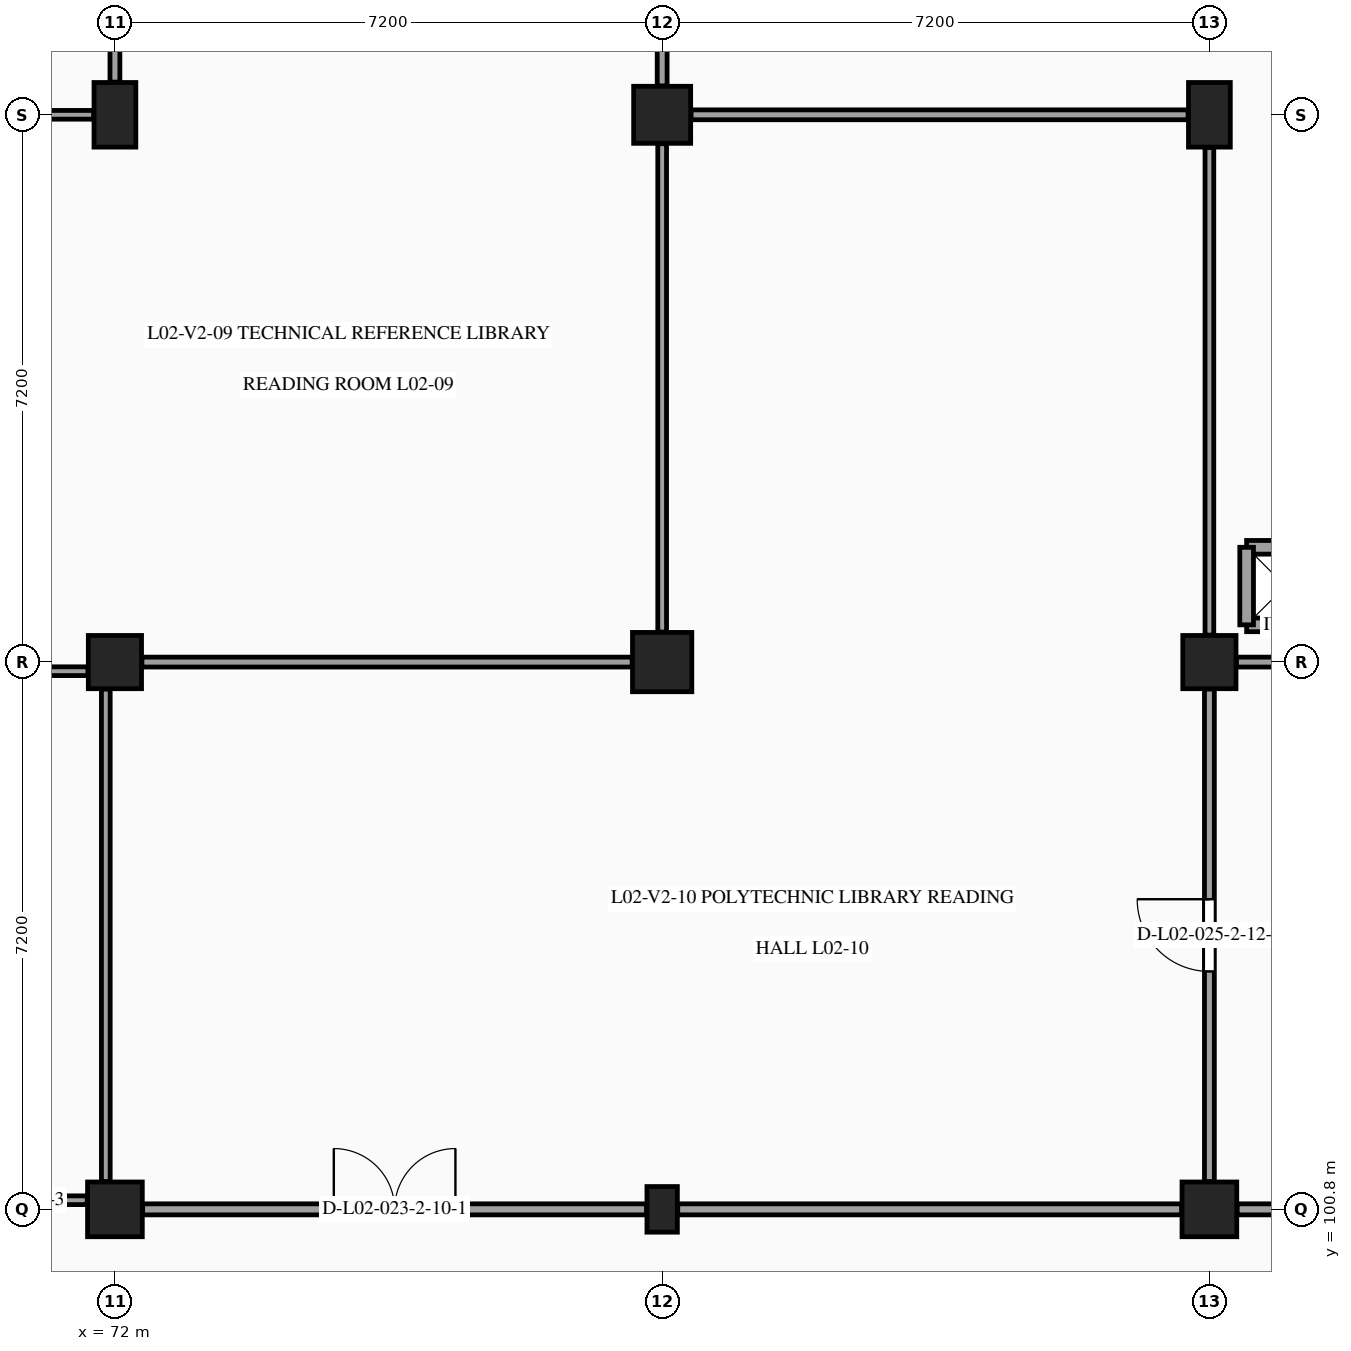
"""IFC4 building model, lengths in metres.
Left out: names, types, materials, properties, quantities, classifications, styles, units other than length and angle.
Written with IfcOpenShell. Run it as: python <this file> out.ifc"""

import sys

from ifc_helpers import new_model, si_unit, direction, frame, frame_2d, origin, origin_2d, place, context, subcontext, project, spatial, rectangle, extrude, element, fill, save


model = new_model("IFC4")
c1 = context("Model", 3, precision=1e-05, world=origin(), true_north=direction((0.0, 1.0)))
c2 = subcontext(c1, "Body", "Model", "MODEL_VIEW")
j1 = project(units=[si_unit("LENGTHUNIT", "METRE"), si_unit("PLANEANGLEUNIT", "RADIAN")], contexts=[c1])
p1 = place(None, origin())
s1 = spatial("IfcSite", under=j1, at=p1, CompositionType="ELEMENT")
p2 = place(p1, origin())
s2 = spatial("IfcBuilding", under=s1, at=p2, CompositionType="ELEMENT")
p3 = place(p2, frame((0.0, 0.0, 9.9)))
s3 = spatial("IfcBuildingStorey", under=s2, at=p3, CompositionType="ELEMENT", Elevation=9.9)
p4 = place(p3, frame((72.0, 100.8, 0.0), z_axis=(0.0, 0.0, 1.0), x_axis=(1.0, 0.0, 0.0)))
e1 = element("IfcColumn", 1, at=p4, inside=s3, PredefinedType="COLUMN", context=c2, shape_type="SweptSolid", body=[
    extrude(rectangle(XDim=0.72, YDim=0.72, at=origin_2d()), origin(), (0.0, 0.0, 1.0), 4.5),
])
p5 = place(p3, frame((72.0, 108.0, 0.0), z_axis=(0.0, 0.0, 1.0), x_axis=(1.0, 0.0, 0.0)))
e2 = element("IfcColumn", 2, at=p5, inside=s3, PredefinedType="COLUMN", context=c2, shape_type="SweptSolid", body=[
    extrude(rectangle(XDim=0.7, YDim=0.7, at=origin_2d()), origin(), (0.0, 0.0, 1.0), 4.5),
])
p6 = place(p3, frame((72.0, 115.2, 0.0), z_axis=(0.0, 0.0, 1.0), x_axis=(1.0, 0.0, 0.0)))
e3 = element("IfcColumn", 3, at=p6, inside=s3, PredefinedType="COLUMN", context=c2, shape_type="SweptSolid", body=[
    extrude(rectangle(XDim=0.55, YDim=0.85, at=origin_2d()), origin(), (0.0, 0.0, 1.0), 4.5),
])
p7 = place(p3, frame((79.2, 100.8, 0.0), z_axis=(0.0, 0.0, 1.0), x_axis=(1.0, 0.0, 0.0)))
e4 = element("IfcColumn", 4, at=p7, inside=s3, PredefinedType="PILASTER", context=c2, shape_type="SweptSolid", body=[
    extrude(rectangle(XDim=0.4, YDim=0.6, at=origin_2d()), origin(), (0.0, 0.0, 1.0), 4.5),
])
p8 = place(p3, frame((79.2, 108.0, 0.0), z_axis=(0.0, 0.0, 1.0), x_axis=(1.0, 0.0, 0.0)))
e5 = element("IfcColumn", 5, at=p8, inside=s3, PredefinedType="COLUMN", context=c2, shape_type="SweptSolid", body=[
    extrude(rectangle(XDim=0.78, YDim=0.78, at=origin_2d()), origin(), (0.0, 0.0, 1.0), 4.5),
])
p9 = place(p3, frame((79.2, 115.2, 0.0), z_axis=(0.0, 0.0, 1.0), x_axis=(1.0, 0.0, 0.0)))
e6 = element("IfcColumn", 6, at=p9, inside=s3, PredefinedType="COLUMN", context=c2, shape_type="SweptSolid", body=[
    extrude(rectangle(XDim=0.75, YDim=0.75, at=origin_2d()), origin(), (0.0, 0.0, 1.0), 4.5),
])
p10 = place(p3, frame((86.4, 100.8, 0.0), z_axis=(0.0, 0.0, 1.0), x_axis=(1.0, 0.0, 0.0)))
e7 = element("IfcColumn", 7, at=p10, inside=s3, PredefinedType="COLUMN", context=c2, shape_type="SweptSolid", body=[
    extrude(rectangle(XDim=0.72, YDim=0.72, at=origin_2d()), origin(), (0.0, 0.0, 1.0), 4.5),
])
p11 = place(p3, frame((86.4, 108.0, 0.0), z_axis=(0.0, 0.0, 1.0), x_axis=(1.0, 0.0, 0.0)))
e8 = element("IfcColumn", 8, at=p11, inside=s3, PredefinedType="COLUMN", context=c2, shape_type="SweptSolid", body=[
    extrude(rectangle(XDim=0.7, YDim=0.7, at=origin_2d()), origin(), (0.0, 0.0, 1.0), 4.5),
])
p12 = place(p3, frame((86.4, 115.2, 0.0), z_axis=(0.0, 0.0, 1.0), x_axis=(1.0, 0.0, 0.0)))
e9 = element("IfcColumn", 9, at=p12, inside=s3, PredefinedType="COLUMN", context=c2, shape_type="SweptSolid", body=[
    extrude(rectangle(XDim=0.55, YDim=0.85, at=origin_2d()), origin(), (0.0, 0.0, 1.0), 4.5),
])
p13 = place(p3, frame((65.005, 100.92, 0.0), z_axis=(0.0, 0.0, 1.0), x_axis=(1.0, 0.0, 0.0)))
e10 = element("IfcWall", 10, at=p13, inside=s3, PredefinedType="PARTITIONING", context=c2, shape_type="SweptSolid", body=[
    extrude(rectangle(XDim=6.63, YDim=0.115, at=frame_2d((3.315, 0.0))), origin(), (0.0, 0.0, 1.0), 3.475),
])
p14 = place(p13, frame((0.795, 0.0, 0.0)))
e11 = element("IfcOpeningElement", 11, at=p14, cuts=e10, PredefinedType="OPENING", context=c2, shape_type="SweptSolid", body=[
    extrude(rectangle(XDim=0.95, YDim=2.1, at=frame_2d((0.475, 1.05))), frame((0.0, 0.067, 0.0), z_axis=(0.0, -1.0, 0.0), x_axis=(1.0, 0.0, 0.0)), (0.0, 0.0, 1.0), 0.135),
])
p15 = place(p13, frame((2.895, 0.0, 0.0)))
e12 = element("IfcOpeningElement", 12, at=p15, cuts=e10, PredefinedType="OPENING", context=c2, shape_type="SweptSolid", body=[
    extrude(rectangle(XDim=0.95, YDim=2.1, at=frame_2d((0.475, 1.05))), frame((0.0, 0.067, 0.0), z_axis=(0.0, -1.0, 0.0), x_axis=(1.0, 0.0, 0.0)), (0.0, 0.0, 1.0), 0.135),
])
p16 = place(p13, frame((5.045, 0.0, 0.0)))
e13 = element("IfcOpeningElement", 13, at=p16, cuts=e10, PredefinedType="OPENING", context=c2, shape_type="SweptSolid", body=[
    extrude(rectangle(XDim=1.0, YDim=2.15, at=frame_2d((0.5, 1.075))), frame((0.0, 0.067, 0.0), z_axis=(0.0, -1.0, 0.0), x_axis=(1.0, 0.0, 0.0)), (0.0, 0.0, 1.0), 0.135),
])
p17 = place(p3, frame((65.195, 107.88, 0.0), z_axis=(0.0, 0.0, 1.0), x_axis=(1.0, 0.0, 0.0)))
e14 = element("IfcWall", 14, at=p17, inside=s3, PredefinedType="PARTITIONING", context=c2, shape_type="SweptSolid", body=[
    extrude(rectangle(XDim=6.45, YDim=0.115, at=frame_2d((3.225, 0.0))), origin(), (0.0, 0.0, 1.0), 3.475),
])
p18 = place(p3, frame((71.88, 101.165, 0.0), z_axis=(0.0, 0.0, 1.0), x_axis=(0.0, 1.0, 0.0)))
e15 = element("IfcWall", 15, at=p18, inside=s3, PredefinedType="PARTITIONING", context=c2, shape_type="SweptSolid", body=[
    extrude(rectangle(XDim=6.48, YDim=0.115, at=frame_2d((3.24, 0.0))), origin(), (0.0, 0.0, 1.0), 3.54),
])
for number, where, z_axis, x_axis in (
    (16, (86.89, 108.49, 0.0), (0.0, 0.0, 1.0), (1.0, 0.0, 0.0)),
    (17, (87.91, 109.51, 0.0), (0.0, 0.0, 1.0), (-1.0, 0.0, 0.0)),
    (18, (86.89, 109.51, 0.0), (0.0, 0.0, 1.0), (0.0, -1.0, 0.0)),
):
    element("IfcWall", number, at=place(p3, frame(where, z_axis=z_axis, x_axis=x_axis)), inside=s3, PredefinedType="PARTITIONING", context=c2, shape_type="SweptSolid", body=[
        extrude(rectangle(XDim=1.02, YDim=0.18, at=frame_2d((0.51, 0.0))), origin(), (0.0, 0.0, 1.0), 4.225),
    ])
p19 = place(p3, frame((65.18, 115.2, 0.0), z_axis=(0.0, 0.0, 1.0), x_axis=(1.0, 0.0, 0.0)))
e19 = element("IfcWall", 19, at=p19, inside=s3, PredefinedType="PARTITIONING", context=c2, shape_type="SweptSolid", body=[
    extrude(rectangle(XDim=6.54, YDim=0.115, at=frame_2d((3.27, 0.0))), origin(), (0.0, 0.0, 1.0), 3.475),
])
p20 = place(p3, frame((72.0, 115.63, 0.0), z_axis=(0.0, 0.0, 1.0), x_axis=(0.0, 1.0, 0.0)))
e20 = element("IfcWall", 20, at=p20, inside=s3, PredefinedType="PARTITIONING", context=c2, shape_type="SweptSolid", body=[
    extrude(rectangle(XDim=6.465, YDim=0.13, at=frame_2d((3.232, 0.0))), origin(), (0.0, 0.0, 1.0), 3.53),
])
p21 = place(p3, frame((72.365, 100.8, 0.0), z_axis=(0.0, 0.0, 1.0), x_axis=(1.0, 0.0, 0.0)))
e21 = element("IfcWall", 21, at=p21, inside=s3, PredefinedType="PARTITIONING", context=c2, shape_type="SweptSolid", body=[
    extrude(rectangle(XDim=6.63, YDim=0.145, at=frame_2d((3.315, 0.0))), origin(), (0.0, 0.0, 1.0), 3.485),
])
p22 = place(p21, frame((2.515, 0.0, 0.0)))
e22 = element("IfcOpeningElement", 22, at=p22, cuts=e21, PredefinedType="OPENING", context=c2, shape_type="SweptSolid", body=[
    extrude(rectangle(XDim=1.6, YDim=2.2, at=frame_2d((0.8, 1.1))), frame((0.0, 0.083, 0.0), z_axis=(0.0, -1.0, 0.0), x_axis=(1.0, 0.0, 0.0)), (0.0, 0.0, 1.0), 0.165),
])
p23 = place(p3, frame((72.355, 108.0, 0.0), z_axis=(0.0, 0.0, 1.0), x_axis=(1.0, 0.0, 0.0)))
e23 = element("IfcWall", 23, at=p23, inside=s3, PredefinedType="PARTITIONING", context=c2, shape_type="SweptSolid", body=[
    extrude(rectangle(XDim=6.45, YDim=0.13, at=frame_2d((3.225, 0.0))), origin(), (0.0, 0.0, 1.0), 3.485),
])
p24 = place(p3, frame((79.2, 108.395, 0.0), z_axis=(0.0, 0.0, 1.0), x_axis=(0.0, 1.0, 0.0)))
e24 = element("IfcWall", 24, at=p24, inside=s3, PredefinedType="PARTITIONING", context=c2, shape_type="SweptSolid", body=[
    extrude(rectangle(XDim=6.425, YDim=0.115, at=frame_2d((3.212, 0.0))), origin(), (0.0, 0.0, 1.0), 3.535),
])
p25 = place(p3, frame((79.2, 115.58, 0.0), z_axis=(0.0, 0.0, 1.0), x_axis=(0.0, 1.0, 0.0)))
e25 = element("IfcWall", 25, at=p25, inside=s3, PredefinedType="PARTITIONING", context=c2, shape_type="SweptSolid", body=[
    extrude(rectangle(XDim=6.455, YDim=0.13, at=frame_2d((3.228, 0.0))), origin(), (0.0, 0.0, 1.0), 3.53),
])
p26 = place(p25, frame((2.427, 0.0, 0.0)))
e26 = element("IfcOpeningElement", 26, at=p26, cuts=e25, PredefinedType="OPENING", context=c2, shape_type="SweptSolid", body=[
    extrude(rectangle(XDim=1.6, YDim=2.2, at=frame_2d((0.8, 1.1))), frame((0.0, 0.075, 0.0), z_axis=(0.0, -1.0, 0.0), x_axis=(1.0, 0.0, 0.0)), (0.0, 0.0, 1.0), 0.15),
])
p27 = place(p3, frame((79.405, 100.8, 0.0), z_axis=(0.0, 0.0, 1.0), x_axis=(1.0, 0.0, 0.0)))
e27 = element("IfcWall", 27, at=p27, inside=s3, PredefinedType="PARTITIONING", context=c2, shape_type="SweptSolid", body=[
    extrude(rectangle(XDim=6.63, YDim=0.145, at=frame_2d((3.315, 0.0))), origin(), (0.0, 0.0, 1.0), 3.5),
])
p28 = place(p3, frame((86.4, 101.165, 0.0), z_axis=(0.0, 0.0, 1.0), x_axis=(0.0, 1.0, 0.0)))
e28 = element("IfcWall", 28, at=p28, inside=s3, PredefinedType="PARTITIONING", context=c2, shape_type="SweptSolid", body=[
    extrude(rectangle(XDim=6.48, YDim=0.13, at=frame_2d((3.24, 0.0))), origin(), (0.0, 0.0, 1.0), 3.54),
])
p29 = place(p28, frame((2.765, 0.0, 0.0)))
e29 = element("IfcOpeningElement", 29, at=p29, cuts=e28, PredefinedType="OPENING", context=c2, shape_type="SweptSolid", body=[
    extrude(rectangle(XDim=0.95, YDim=2.15, at=frame_2d((0.475, 1.075))), frame((0.0, 0.075, 0.0), z_axis=(0.0, -1.0, 0.0), x_axis=(1.0, 0.0, 0.0)), (0.0, 0.0, 1.0), 0.15),
])
p30 = place(p3, frame((86.4, 108.355, 0.0), z_axis=(0.0, 0.0, 1.0), x_axis=(0.0, 1.0, 0.0)))
e30 = element("IfcWall", 30, at=p30, inside=s3, PredefinedType="PARTITIONING", context=c2, shape_type="SweptSolid", body=[
    extrude(rectangle(XDim=6.415, YDim=0.115, at=frame_2d((3.208, 0.0))), origin(), (0.0, 0.0, 1.0), 3.535),
])
p31 = place(p3, frame((79.58, 115.2, 0.0), z_axis=(0.0, 0.0, 1.0), x_axis=(1.0, 0.0, 0.0)))
e31 = element("IfcWall", 31, at=p31, inside=s3, PredefinedType="PARTITIONING", context=c2, shape_type="SweptSolid", body=[
    extrude(rectangle(XDim=6.54, YDim=0.13, at=frame_2d((3.27, 0.0))), origin(), (0.0, 0.0, 1.0), 3.5),
])
p32 = place(p3, frame((86.765, 100.8, 0.0), z_axis=(0.0, 0.0, 1.0), x_axis=(1.0, 0.0, 0.0)))
e32 = element("IfcWall", 32, at=p32, inside=s3, PredefinedType="PARTITIONING", context=c2, shape_type="SweptSolid", body=[
    extrude(rectangle(XDim=6.63, YDim=0.145, at=frame_2d((3.315, 0.0))), origin(), (0.0, 0.0, 1.0), 3.505),
])
p33 = place(p3, frame((86.755, 108.0, 0.0), z_axis=(0.0, 0.0, 1.0), x_axis=(1.0, 0.0, 0.0)))
e33 = element("IfcWall", 33, at=p33, inside=s3, PredefinedType="PARTITIONING", context=c2, shape_type="SweptSolid", body=[
    extrude(rectangle(XDim=6.45, YDim=0.13, at=frame_2d((3.225, 0.0))), origin(), (0.0, 0.0, 1.0), 3.505),
])
p34 = place(p22, origin())
e34 = element("IfcDoor", 34, at=p34, inside=s3, OperationType="DOUBLE_DOOR_SINGLE_SWING", PredefinedType="DOOR", context=c2, shape_type="SweptSolid", body=[
    extrude(rectangle(XDim=1.6, YDim=2.2, at=frame_2d((0.8, 1.1))), frame((0.0, 0.025, 0.0), z_axis=(0.0, -1.0, 0.0), x_axis=(1.0, 0.0, 0.0)), (0.0, 0.0, 1.0), 0.05),
])
fill(e22, e34)
p35 = place(p29, origin())
e35 = element("IfcDoor", 35, at=p35, inside=s3, OperationType="SINGLE_SWING_RIGHT", PredefinedType="DOOR", context=c2, shape_type="SweptSolid", body=[
    extrude(rectangle(XDim=0.95, YDim=2.15, at=frame_2d((0.475, 1.075))), frame((0.0, 0.025, 0.0), z_axis=(0.0, -1.0, 0.0), x_axis=(1.0, 0.0, 0.0)), (0.0, 0.0, 1.0), 0.05),
])
fill(e29, e35)
save(model, sys.argv[1])
